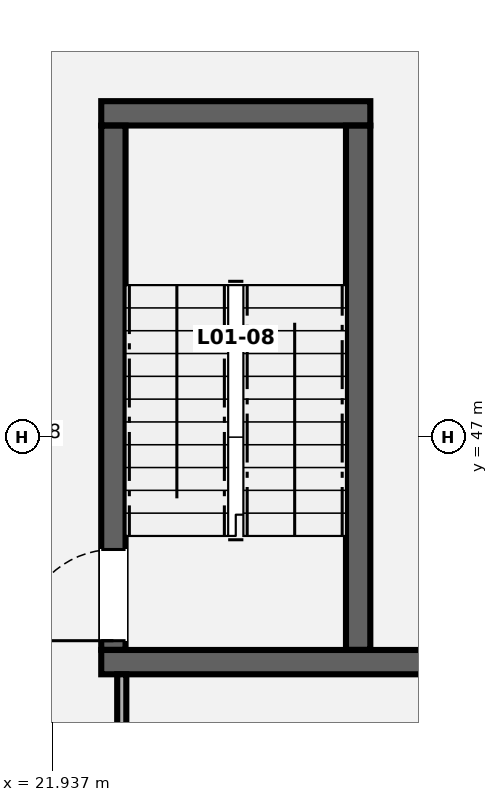
"""IFC4 building model, lengths in metres.
Left out: names, types, materials, properties, quantities, classifications, styles, units other than length and angle.
Written with IfcOpenShell. Run it as: python <this file> out.ifc"""

import sys

from ifc_helpers import new_model, si_unit, direction, frame, frame_2d, origin, place, context, subcontext, project, spatial, rectangle, extrude, element, fill, save


model = new_model("IFC4")
c1 = context("Model", 3, precision=1e-05, world=origin(), true_north=direction((0.0, 1.0)))
c2 = subcontext(c1, "Body", "Model", "MODEL_VIEW")
j1 = project(units=[si_unit("LENGTHUNIT", "METRE"), si_unit("PLANEANGLEUNIT", "RADIAN")], contexts=[c1])
p1 = place(None, origin())
s1 = spatial("IfcSite", under=j1, at=p1, CompositionType="ELEMENT")
p2 = place(p1, origin())
s2 = spatial("IfcBuilding", under=s1, at=p2, CompositionType="ELEMENT")
p3 = place(p2, frame((0.0, 0.0, 4.9)))
s3 = spatial("IfcBuildingStorey", under=s2, at=p3, CompositionType="ELEMENT", Elevation=4.9)
p4 = place(p3, frame((22.58, 44.04, 0.0), z_axis=(0.0, 0.0, 1.0), x_axis=(1.0, 0.0, 0.0)))
e1 = element("IfcWall", 1, at=p4, inside=s3, PredefinedType="SHEAR", context=c2, shape_type="SweptSolid", body=[
    extrude(rectangle(XDim=4.485, YDim=0.32, at=frame_2d((2.242, 0.0))), origin(), (0.0, 0.0, 1.0), 4.0),
])
p5 = place(p3, frame((22.58, 51.26, 0.0), z_axis=(0.0, 0.0, 1.0), x_axis=(1.0, 0.0, 0.0)))
e2 = element("IfcWall", 2, at=p5, inside=s3, PredefinedType="SHEAR", context=c2, shape_type="SweptSolid", body=[
    extrude(rectangle(XDim=3.54, YDim=0.32, at=frame_2d((1.77, 0.0))), origin(), (0.0, 0.0, 1.0), 4.0),
])
p6 = place(p3, frame((22.74, 44.202, 0.0), z_axis=(0.0, 0.0, 1.0), x_axis=(0.0, 1.0, 0.0)))
e3 = element("IfcWall", 3, at=p6, inside=s3, PredefinedType="SHEAR", context=c2, shape_type="SweptSolid", body=[
    extrude(rectangle(XDim=6.896, YDim=0.32, at=frame_2d((3.448, 0.0))), origin(), (0.0, 0.0, 1.0), 4.0),
])
p7 = place(p6, frame((0.12, 0.0, 0.0)))
e4 = element("IfcOpeningElement", 4, at=p7, cuts=e3, PredefinedType="OPENING", context=c2, shape_type="SweptSolid", body=[
    extrude(rectangle(XDim=1.2, YDim=2.15, at=frame_2d((0.6, 1.075))), frame((0.0, 0.17, 0.0), z_axis=(0.0, -1.0, 0.0), x_axis=(1.0, 0.0, 0.0)), (0.0, 0.0, 1.0), 0.34),
])
p8 = place(p3, frame((25.96, 44.202, 0.0), z_axis=(0.0, 0.0, 1.0), x_axis=(0.0, 1.0, 0.0)))
e5 = element("IfcWall", 5, at=p8, inside=s3, PredefinedType="SHEAR", context=c2, shape_type="SweptSolid", body=[
    extrude(rectangle(XDim=6.896, YDim=0.32, at=frame_2d((3.448, 0.0))), origin(), (0.0, 0.0, 1.0), 4.0),
])
p9 = place(p3, frame((22.85, 31.2, 0.0), z_axis=(0.0, 0.0, 1.0), x_axis=(0.0, 1.0, 0.0)))
e6 = element("IfcWall", 6, at=p9, inside=s3, PredefinedType="PARTITIONING", context=c2, shape_type="SweptSolid", body=[
    extrude(rectangle(XDim=12.68, YDim=0.12, at=frame_2d((6.34, 0.0))), origin(), (0.0, 0.0, 1.0), 4.0),
])
p10 = place(p9, frame((5.8, 0.0, 0.0)))
e7 = element("IfcOpeningElement", 7, at=p10, cuts=e6, PredefinedType="OPENING", context=c2, shape_type="SweptSolid", body=[
    extrude(rectangle(XDim=1.08, YDim=2.12, at=frame_2d((0.54, 1.06))), frame((0.0, 0.07, 0.0), z_axis=(0.0, -1.0, 0.0), x_axis=(1.0, 0.0, 0.0)), (0.0, 0.0, 1.0), 0.14),
])
p11 = place(p7, origin())
e8 = element("IfcDoor", 8, at=p11, inside=s3, OperationType="SINGLE_SWING_LEFT", PredefinedType="DOOR", context=c2, shape_type="SweptSolid", body=[
    extrude(rectangle(XDim=1.2, YDim=2.15, at=frame_2d((0.6, 1.075))), frame((0.0, 0.025, 0.0), z_axis=(0.0, -1.0, 0.0), x_axis=(1.0, 0.0, 0.0)), (0.0, 0.0, 1.0), 0.05),
])
fill(e4, e8)
save(model, sys.argv[1])
